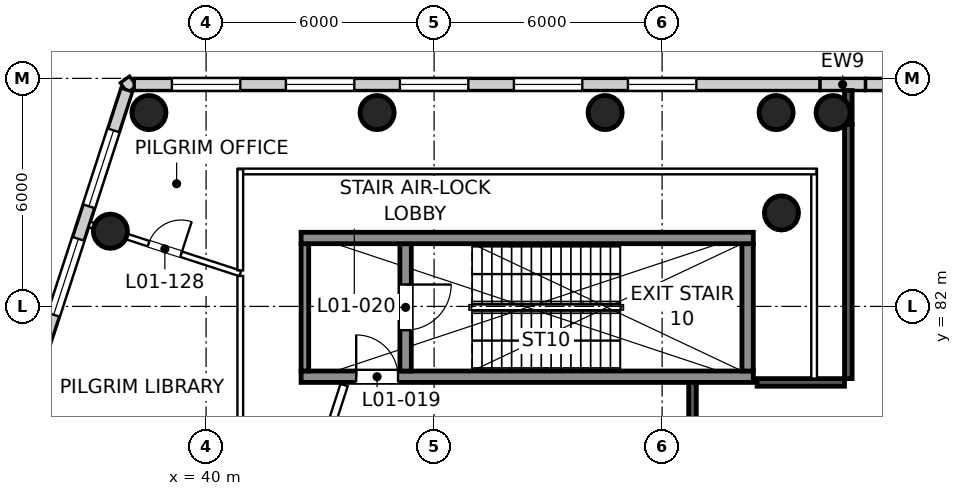
"""IFC4 building model, lengths in metres.
Left out: names, types, materials, properties, quantities, classifications, styles, units other than length and angle.
Written with IfcOpenShell. Run it as: python <this file> out.ifc"""

import sys

from ifc_helpers import new_model, si_unit, direction, frame, frame_2d, origin, origin_2d, place, context, subcontext, project, spatial, rectangle, circle, extrude, element, fill, save


model = new_model("IFC4")
c1 = context("Model", 3, precision=1e-05, world=origin(), true_north=direction((0.0, 1.0)))
c2 = subcontext(c1, "Body", "Model", "MODEL_VIEW")
j1 = project(units=[si_unit("LENGTHUNIT", "METRE"), si_unit("PLANEANGLEUNIT", "RADIAN")], contexts=[c1])
p1 = place(None, origin())
s1 = spatial("IfcSite", under=j1, at=p1, CompositionType="ELEMENT")
p2 = place(p1, origin())
s2 = spatial("IfcBuilding", under=s1, at=p2, CompositionType="ELEMENT")
p3 = place(p2, frame((0.0, 0.0, 9.0)))
s3 = spatial("IfcBuildingStorey", under=s2, at=p3, CompositionType="ELEMENT", Elevation=9.0)
for number, where, z_axis, x_axis in (
    (1, (55.14, 84.46, 0.0), (0.0, 0.0, 1.0), (1.0, 0.0, 0.0)),
    (2, (56.5, 87.1, 0.0), (0.0, 0.0, 1.0), (1.0, 0.0, 0.0)),
    (3, (50.5, 87.1, 0.0), (0.0, 0.0, 1.0), (1.0, 0.0, 0.0)),
    (4, (44.5, 87.1, 0.0), (0.0, 0.0, 1.0), (1.0, 0.0, 0.0)),
    (5, (38.496, 87.1, 0.0), (0.0, 0.0, 1.0), (1.0, 0.0, 0.0)),
    (6, (37.482, 83.978, 0.0), (0.0, 0.0, 1.0), (1.0, 0.0, 0.0)),
    (7, (55.0, 87.1, 0.0), (0.0, 0.0, 1.0), (1.0, 0.0, 0.0)),
):
    element("IfcColumn", number, at=place(p3, frame(where, z_axis=z_axis, x_axis=x_axis)), inside=s3, PredefinedType="COLUMN", context=c2, shape_type="SweptSolid", body=[
        extrude(circle(Radius=0.45, at=origin_2d()), origin(), (0.0, 0.0, 1.0), 6.0),
    ])
p4 = place(p3, frame((38.08, 87.928, 0.0), z_axis=(0.0, 0.0, 1.0), x_axis=(-0.809087927272, -0.587687609145, 0.0)))
e8 = element("IfcWall", 8, at=p4, inside=s3, PredefinedType="SOLIDWALL", context=c2, shape_type="SweptSolid", body=[
    extrude(rectangle(XDim=0.3, YDim=0.32, at=frame_2d((0.15, 0.0))), origin(), (0.0, 0.0, 1.0), 5.65),
])
p5 = place(p3, frame((59.0, 87.84, 0.0), z_axis=(0.0, 0.0, 1.0), x_axis=(-1.0, 0.0, 0.0)))
e9 = element("IfcWall", 9, at=p5, inside=s3, PredefinedType="SOLIDWALL", context=c2, shape_type="SweptSolid", body=[
    extrude(rectangle(XDim=1.649, YDim=0.32, at=frame_2d((0.825, 0.0))), origin(), (0.0, 0.0, 1.0), 5.65),
])
p6 = place(p3, frame((57.351, 87.84, 0.0), z_axis=(0.0, 0.0, 1.0), x_axis=(-1.0, 0.0, 0.0)))
e10 = element("IfcWall", 10, at=p6, inside=s3, PredefinedType="SOLIDWALL", context=c2, shape_type="SweptSolid", body=[
    extrude(rectangle(XDim=1.2, YDim=0.32, at=frame_2d((0.6, 0.0))), origin(), (0.0, 0.0, 1.0), 5.65),
])
p7 = place(p3, frame((56.15, 87.84, 0.0), z_axis=(0.0, 0.0, 1.0), x_axis=(-1.0, 0.0, 0.0)))
e11 = element("IfcWall", 11, at=p7, inside=s3, PredefinedType="SOLIDWALL", context=c2, shape_type="SweptSolid", body=[
    extrude(rectangle(XDim=18.042, YDim=0.32, at=frame_2d((9.021, 0.0))), origin(), (0.0, 0.0, 1.0), 5.65),
])
p8 = place(p7, frame((3.25, 0.0, 0.9)))
e12 = element("IfcOpeningElement", 12, at=p8, cuts=e11, PredefinedType="OPENING", context=c2, shape_type="SweptSolid", body=[
    extrude(rectangle(XDim=1.8, YDim=2.1, at=frame_2d((0.9, 1.05))), frame((0.0, 0.17, 0.0), z_axis=(0.0, -1.0, 0.0), x_axis=(1.0, 0.0, 0.0)), (0.0, 0.0, 1.0), 0.34),
])
p9 = place(p7, frame((6.25, 0.0, 0.9)))
e13 = element("IfcOpeningElement", 13, at=p9, cuts=e11, PredefinedType="OPENING", context=c2, shape_type="SweptSolid", body=[
    extrude(rectangle(XDim=1.8, YDim=2.1, at=frame_2d((0.9, 1.05))), frame((0.0, 0.17, 0.0), z_axis=(0.0, -1.0, 0.0), x_axis=(1.0, 0.0, 0.0)), (0.0, 0.0, 1.0), 0.34),
])
p10 = place(p7, frame((9.25, 0.0, 0.9)))
e14 = element("IfcOpeningElement", 14, at=p10, cuts=e11, PredefinedType="OPENING", context=c2, shape_type="SweptSolid", body=[
    extrude(rectangle(XDim=1.8, YDim=2.1, at=frame_2d((0.9, 1.05))), frame((0.0, 0.17, 0.0), z_axis=(0.0, -1.0, 0.0), x_axis=(1.0, 0.0, 0.0)), (0.0, 0.0, 1.0), 0.34),
])
p11 = place(p7, frame((12.25, 0.0, 0.9)))
e15 = element("IfcOpeningElement", 15, at=p11, cuts=e11, PredefinedType="OPENING", context=c2, shape_type="SweptSolid", body=[
    extrude(rectangle(XDim=1.8, YDim=2.1, at=frame_2d((0.9, 1.05))), frame((0.0, 0.17, 0.0), z_axis=(0.0, -1.0, 0.0), x_axis=(1.0, 0.0, 0.0)), (0.0, 0.0, 1.0), 0.34),
])
p12 = place(p7, frame((15.25, 0.0, 0.9)))
e16 = element("IfcOpeningElement", 16, at=p12, cuts=e11, PredefinedType="OPENING", context=c2, shape_type="SweptSolid", body=[
    extrude(rectangle(XDim=1.8, YDim=2.1, at=frame_2d((0.9, 1.05))), frame((0.0, 0.17, 0.0), z_axis=(0.0, -1.0, 0.0), x_axis=(1.0, 0.0, 0.0)), (0.0, 0.0, 1.0), 0.34),
])
p13 = place(p3, frame((37.912, 87.697, 0.0), z_axis=(0.0, 0.0, 1.0), x_axis=(-0.309016476183, -0.951056684666, 0.0)))
e17 = element("IfcWall", 17, at=p13, inside=s3, PredefinedType="SOLIDWALL", context=c2, shape_type="SweptSolid", body=[
    extrude(rectangle(XDim=28.556, YDim=0.32, at=frame_2d((14.278, 0.0))), origin(), (0.0, 0.0, 1.0), 5.65),
])
p14 = place(p13, frame((1.121, 0.0, 0.9)))
e18 = element("IfcOpeningElement", 18, at=p14, cuts=e17, PredefinedType="OPENING", context=c2, shape_type="SweptSolid", body=[
    extrude(rectangle(XDim=2.1, YDim=3.0, at=frame_2d((1.05, 1.5))), frame((0.0, 0.17, 0.0), z_axis=(0.0, -1.0, 0.0), x_axis=(1.0, 0.0, 0.0)), (0.0, 0.0, 1.0), 0.34),
])
p15 = place(p13, frame((4.121, 0.0, 0.9)))
e19 = element("IfcOpeningElement", 19, at=p15, cuts=e17, PredefinedType="OPENING", context=c2, shape_type="SweptSolid", body=[
    extrude(rectangle(XDim=2.1, YDim=3.0, at=frame_2d((1.05, 1.5))), frame((0.0, 0.17, 0.0), z_axis=(0.0, -1.0, 0.0), x_axis=(1.0, 0.0, 0.0)), (0.0, 0.0, 1.0), 0.34),
])
p16 = place(p13, frame((7.121, 0.0, 0.9)))
e20 = element("IfcOpeningElement", 20, at=p16, cuts=e17, PredefinedType="OPENING", context=c2, shape_type="SweptSolid", body=[
    extrude(rectangle(XDim=2.1, YDim=3.0, at=frame_2d((1.05, 1.5))), frame((0.0, 0.17, 0.0), z_axis=(0.0, -1.0, 0.0), x_axis=(1.0, 0.0, 0.0)), (0.0, 0.0, 1.0), 0.34),
])
p17 = place(p13, frame((10.121, 0.0, 0.9)))
e21 = element("IfcOpeningElement", 21, at=p17, cuts=e17, PredefinedType="OPENING", context=c2, shape_type="SweptSolid", body=[
    extrude(rectangle(XDim=2.1, YDim=3.0, at=frame_2d((1.05, 1.5))), frame((0.0, 0.17, 0.0), z_axis=(0.0, -1.0, 0.0), x_axis=(1.0, 0.0, 0.0)), (0.0, 0.0, 1.0), 0.34),
])
p18 = place(p13, frame((13.121, 0.0, 0.9)))
e22 = element("IfcOpeningElement", 22, at=p18, cuts=e17, PredefinedType="OPENING", context=c2, shape_type="SweptSolid", body=[
    extrude(rectangle(XDim=2.1, YDim=3.0, at=frame_2d((1.05, 1.5))), frame((0.0, 0.17, 0.0), z_axis=(0.0, -1.0, 0.0), x_axis=(1.0, 0.0, 0.0)), (0.0, 0.0, 1.0), 0.34),
])
p19 = place(p13, frame((16.121, 0.0, 0.9)))
e23 = element("IfcOpeningElement", 23, at=p19, cuts=e17, PredefinedType="OPENING", context=c2, shape_type="SweptSolid", body=[
    extrude(rectangle(XDim=2.1, YDim=3.0, at=frame_2d((1.05, 1.5))), frame((0.0, 0.17, 0.0), z_axis=(0.0, -1.0, 0.0), x_axis=(1.0, 0.0, 0.0)), (0.0, 0.0, 1.0), 0.34),
])
p20 = place(p13, frame((19.121, 0.0, 0.9)))
e24 = element("IfcOpeningElement", 24, at=p20, cuts=e17, PredefinedType="OPENING", context=c2, shape_type="SweptSolid", body=[
    extrude(rectangle(XDim=2.1, YDim=3.0, at=frame_2d((1.05, 1.5))), frame((0.0, 0.17, 0.0), z_axis=(0.0, -1.0, 0.0), x_axis=(1.0, 0.0, 0.0)), (0.0, 0.0, 1.0), 0.34),
])
p21 = place(p13, frame((22.121, 0.0, 0.9)))
e25 = element("IfcOpeningElement", 25, at=p21, cuts=e17, PredefinedType="OPENING", context=c2, shape_type="SweptSolid", body=[
    extrude(rectangle(XDim=2.1, YDim=3.0, at=frame_2d((1.05, 1.5))), frame((0.0, 0.17, 0.0), z_axis=(0.0, -1.0, 0.0), x_axis=(1.0, 0.0, 0.0)), (0.0, 0.0, 1.0), 0.34),
])
p22 = place(p13, frame((25.121, 0.0, 0.9)))
e26 = element("IfcOpeningElement", 26, at=p22, cuts=e17, PredefinedType="OPENING", context=c2, shape_type="SweptSolid", body=[
    extrude(rectangle(XDim=2.1, YDim=3.0, at=frame_2d((1.05, 1.5))), frame((0.0, 0.17, 0.0), z_axis=(0.0, -1.0, 0.0), x_axis=(1.0, 0.0, 0.0)), (0.0, 0.0, 1.0), 0.34),
])
p23 = place(p3, frame((42.5, 80.15, 0.0), z_axis=(0.0, 0.0, 1.0), x_axis=(1.0, 0.0, 0.0)))
e27 = element("IfcWall", 27, at=p23, inside=s3, PredefinedType="SHEAR", context=c2, shape_type="SweptSolid", body=[
    extrude(rectangle(XDim=11.9, YDim=0.3, at=frame_2d((5.95, 0.0))), origin(), (0.0, 0.0, 1.0), 6.0),
])
p24 = place(p23, frame((1.45, 0.0, 0.0)))
e28 = element("IfcOpeningElement", 28, at=p24, cuts=e27, PredefinedType="OPENING", context=c2, shape_type="SweptSolid", body=[
    extrude(rectangle(XDim=1.1, YDim=2.1, at=frame_2d((0.55, 1.05))), frame((0.0, 0.16, 0.0), z_axis=(0.0, -1.0, 0.0), x_axis=(1.0, 0.0, 0.0)), (0.0, 0.0, 1.0), 0.32),
])
p25 = place(p3, frame((42.6, 80.3, 0.0), z_axis=(0.0, 0.0, 1.0), x_axis=(0.0, 1.0, 0.0)))
e29 = element("IfcWall", 29, at=p25, inside=s3, PredefinedType="SHEAR", context=c2, shape_type="SweptSolid", body=[
    extrude(rectangle(XDim=3.35, YDim=0.2, at=frame_2d((1.675, 0.0))), origin(), (0.0, 0.0, 1.0), 6.0),
])
p26 = place(p3, frame((45.25, 80.3, 0.0), z_axis=(0.0, 0.0, 1.0), x_axis=(0.0, 1.0, 0.0)))
e30 = element("IfcWall", 30, at=p26, inside=s3, PredefinedType="SHEAR", context=c2, shape_type="SweptSolid", body=[
    extrude(rectangle(XDim=3.35, YDim=0.3, at=frame_2d((1.675, 0.0))), origin(), (0.0, 0.0, 1.0), 6.0),
])
p27 = place(p26, frame((1.075, 0.0, 0.0)))
e31 = element("IfcOpeningElement", 31, at=p27, cuts=e30, PredefinedType="OPENING", context=c2, shape_type="SweptSolid", body=[
    extrude(rectangle(XDim=1.2, YDim=2.1, at=frame_2d((0.6, 1.05))), frame((0.0, 0.16, 0.0), z_axis=(0.0, -1.0, 0.0), x_axis=(1.0, 0.0, 0.0)), (0.0, 0.0, 1.0), 0.32),
])
p28 = place(p3, frame((54.25, 80.3, 0.0), z_axis=(0.0, 0.0, 1.0), x_axis=(0.0, 1.0, 0.0)))
e32 = element("IfcWall", 32, at=p28, inside=s3, PredefinedType="SHEAR", context=c2, shape_type="SweptSolid", body=[
    extrude(rectangle(XDim=3.35, YDim=0.3, at=frame_2d((1.675, 0.0))), origin(), (0.0, 0.0, 1.0), 6.0),
])
p29 = place(p3, frame((42.5, 83.8, 0.0), z_axis=(0.0, 0.0, 1.0), x_axis=(1.0, 0.0, 0.0)))
e33 = element("IfcWall", 33, at=p29, inside=s3, PredefinedType="SHEAR", context=c2, shape_type="SweptSolid", body=[
    extrude(rectangle(XDim=11.9, YDim=0.3, at=frame_2d((5.95, 0.0))), origin(), (0.0, 0.0, 1.0), 6.0),
])
p30 = place(p3, frame((37.833, 62.081, 0.0), z_axis=(0.0, 0.0, 1.0), x_axis=(0.309014892187, 0.951057199335, 0.0)))
e34 = element("IfcWall", 34, at=p30, inside=s3, PredefinedType="PARTITIONING", context=c2, shape_type="SweptSolid", body=[
    extrude(rectangle(XDim=18.769, YDim=0.2, at=frame_2d((9.384, 0.0))), origin(), (0.0, 0.0, 1.0), 5.65),
])
p31 = place(p30, frame((13.988, 0.0, 0.0)))
e35 = element("IfcOpeningElement", 35, at=p31, cuts=e34, PredefinedType="OPENING", context=c2, shape_type="SweptSolid", body=[
    extrude(rectangle(XDim=0.9, YDim=2.1, at=frame_2d((0.45, 1.05))), frame((0.0, 0.11, 0.0), z_axis=(0.0, -1.0, 0.0), x_axis=(1.0, 0.0, 0.0)), (0.0, 0.0, 1.0), 0.22),
])
p32 = place(p30, frame((6.767, 0.0, 0.0)))
e36 = element("IfcOpeningElement", 36, at=p32, cuts=e34, PredefinedType="OPENING", context=c2, shape_type="SweptSolid", body=[
    extrude(rectangle(XDim=0.9, YDim=2.1, at=frame_2d((0.45, 1.05))), frame((0.0, 0.11, 0.0), z_axis=(0.0, -1.0, 0.0), x_axis=(1.0, 0.0, 0.0)), (0.0, 0.0, 1.0), 0.22),
])
p33 = place(p30, frame((1.731, 0.0, 0.0)))
e37 = element("IfcOpeningElement", 37, at=p33, cuts=e34, PredefinedType="OPENING", context=c2, shape_type="SweptSolid", body=[
    extrude(rectangle(XDim=0.8, YDim=2.1, at=frame_2d((0.4, 1.05))), frame((0.0, 0.11, 0.0), z_axis=(0.0, -1.0, 0.0), x_axis=(1.0, 0.0, 0.0)), (0.0, 0.0, 1.0), 0.22),
])
p34 = place(p3, frame((54.499, 80.0, 0.0), z_axis=(0.0, 0.0, 1.0), x_axis=(1.0, 0.0, 0.0)))
e38 = element("IfcWall", 38, at=p34, inside=s3, PredefinedType="PARTITIONING", context=c2, shape_type="SweptSolid", body=[
    extrude(rectangle(XDim=2.301, YDim=0.2, at=frame_2d((1.15, 0.0))), origin(), (0.0, 0.0, 1.0), 5.65),
])
p35 = place(p3, frame((56.9, 80.1, 0.0), z_axis=(0.0, 0.0, 1.0), x_axis=(0.0, 1.0, 0.0)))
e39 = element("IfcWall", 39, at=p35, inside=s3, PredefinedType="PARTITIONING", context=c2, shape_type="SweptSolid", body=[
    extrude(rectangle(XDim=6.682, YDim=0.2, at=frame_2d((3.341, 0.0))), origin(), (0.0, 0.0, 1.0), 5.65),
])
p36 = place(p3, frame((56.9, 86.782, 0.0), z_axis=(0.0, 0.0, 1.0), x_axis=(0.0, 1.0, 0.0)))
e40 = element("IfcWall", 40, at=p36, inside=s3, PredefinedType="PARTITIONING", context=c2, shape_type="SweptSolid", body=[
    extrude(rectangle(XDim=0.897, YDim=0.2, at=frame_2d((0.449, 0.0))), origin(), (0.0, 0.0, 1.0), 4.95),
])
p37 = place(p3, frame((36.93, 84.157, 0.0), z_axis=(0.0, 0.0, 1.0), x_axis=(0.951059855583, -0.309006716915, 0.0)))
e41 = element("IfcWall", 41, at=p37, inside=s3, PredefinedType="PARTITIONING", context=c2, shape_type="SweptSolid", body=[
    extrude(rectangle(XDim=4.174, YDim=0.15, at=frame_2d((2.087, 0.0))), origin(), (0.0, 0.0, 1.0), 5.65),
])
p38 = place(p37, frame((1.637, 0.0, 0.0)))
e42 = element("IfcOpeningElement", 42, at=p38, cuts=e41, PredefinedType="OPENING", context=c2, shape_type="SweptSolid", body=[
    extrude(rectangle(XDim=0.9, YDim=2.1, at=frame_2d((0.45, 1.05))), frame((0.0, 0.085, 0.0), z_axis=(0.0, -1.0, 0.0), x_axis=(1.0, 0.0, 0.0)), (0.0, 0.0, 1.0), 0.17),
])
p39 = place(p3, frame((52.8, 64.875, 0.0), z_axis=(0.0, 0.0, 1.0), x_axis=(0.0, 1.0, 0.0)))
e43 = element("IfcWall", 43, at=p39, inside=s3, PredefinedType="PARTITIONING", context=c2, shape_type="SweptSolid", body=[
    extrude(rectangle(XDim=15.125, YDim=0.2, at=frame_2d((7.562, 0.0))), origin(), (0.0, 0.0, 1.0), 5.65),
])
p40 = place(p39, frame((3.637, 0.0, 0.0)))
e44 = element("IfcOpeningElement", 44, at=p40, cuts=e43, PredefinedType="OPENING", context=c2, shape_type="SweptSolid", body=[
    extrude(rectangle(XDim=1.8, YDim=2.1, at=frame_2d((0.9, 1.05))), frame((0.0, 0.11, 0.0), z_axis=(0.0, -1.0, 0.0), x_axis=(1.0, 0.0, 0.0)), (0.0, 0.0, 1.0), 0.22),
])
p41 = place(p39, frame((9.688, 0.0, 0.0)))
e45 = element("IfcOpeningElement", 45, at=p41, cuts=e43, PredefinedType="OPENING", context=c2, shape_type="SweptSolid", body=[
    extrude(rectangle(XDim=1.8, YDim=2.1, at=frame_2d((0.9, 1.05))), frame((0.0, 0.11, 0.0), z_axis=(0.0, -1.0, 0.0), x_axis=(1.0, 0.0, 0.0)), (0.0, 0.0, 1.0), 0.22),
])
p42 = place(p3, frame((40.9, 82.8, 0.0), z_axis=(0.0, 0.0, 1.0), x_axis=(0.0, -1.0, 0.0)))
e46 = element("IfcWall", 46, at=p42, inside=s3, PredefinedType="PARTITIONING", context=c2, shape_type="SweptSolid", body=[
    extrude(rectangle(XDim=4.46, YDim=0.15, at=frame_2d((2.23, 0.0))), origin(), (0.0, 0.0, 1.0), 5.65),
])
p43 = place(p3, frame((56.0, 80.1, 0.0), z_axis=(0.0, 0.0, 1.0), x_axis=(0.0, 1.0, 0.0)))
e47 = element("IfcWall", 47, at=p43, inside=s3, PredefinedType="PARTITIONING", context=c2, shape_type="SweptSolid", body=[
    extrude(rectangle(XDim=5.51, YDim=0.15, at=frame_2d((2.755, 0.0))), origin(), (0.0, 0.0, 1.0), 5.65),
])
p44 = place(p3, frame((56.06, 85.55, 0.0), z_axis=(0.0, 0.0, 1.0), x_axis=(-1.0, 0.0, 0.0)))
e48 = element("IfcWall", 48, at=p44, inside=s3, PredefinedType="PARTITIONING", context=c2, shape_type="SweptSolid", body=[
    extrude(rectangle(XDim=15.22, YDim=0.15, at=frame_2d((7.61, 0.0))), origin(), (0.0, 0.0, 1.0), 4.95),
])
p45 = place(p3, frame((40.9, 85.61, 0.0), z_axis=(0.0, 0.0, 1.0), x_axis=(0.0, -1.0, 0.0)))
e49 = element("IfcWall", 49, at=p45, inside=s3, PredefinedType="PARTITIONING", context=c2, shape_type="SweptSolid", body=[
    extrude(rectangle(XDim=2.661, YDim=0.15, at=frame_2d((1.331, 0.0))), origin(), (0.0, 0.0, 1.0), 5.65),
])
p46 = place(p8, origin())
e50 = element("IfcWindow", 50, at=p46, inside=s3, PartitioningType="SINGLE_PANEL", PredefinedType="WINDOW", context=c2, shape_type="SweptSolid", body=[
    extrude(rectangle(XDim=1.8, YDim=2.1, at=frame_2d((0.9, 1.05))), frame((0.0, 0.07, 0.0), z_axis=(0.0, -1.0, 0.0), x_axis=(1.0, 0.0, 0.0)), (0.0, 0.0, 1.0), 0.06),
])
fill(e12, e50)
p47 = place(p9, origin())
e51 = element("IfcWindow", 51, at=p47, inside=s3, PartitioningType="SINGLE_PANEL", PredefinedType="WINDOW", context=c2, shape_type="SweptSolid", body=[
    extrude(rectangle(XDim=1.8, YDim=2.1, at=frame_2d((0.9, 1.05))), frame((0.0, 0.07, 0.0), z_axis=(0.0, -1.0, 0.0), x_axis=(1.0, 0.0, 0.0)), (0.0, 0.0, 1.0), 0.06),
])
fill(e13, e51)
p48 = place(p10, origin())
e52 = element("IfcWindow", 52, at=p48, inside=s3, PartitioningType="SINGLE_PANEL", PredefinedType="WINDOW", context=c2, shape_type="SweptSolid", body=[
    extrude(rectangle(XDim=1.8, YDim=2.1, at=frame_2d((0.9, 1.05))), frame((0.0, 0.07, 0.0), z_axis=(0.0, -1.0, 0.0), x_axis=(1.0, 0.0, 0.0)), (0.0, 0.0, 1.0), 0.06),
])
fill(e14, e52)
p49 = place(p11, origin())
e53 = element("IfcWindow", 53, at=p49, inside=s3, PartitioningType="SINGLE_PANEL", PredefinedType="WINDOW", context=c2, shape_type="SweptSolid", body=[
    extrude(rectangle(XDim=1.8, YDim=2.1, at=frame_2d((0.9, 1.05))), frame((0.0, 0.07, 0.0), z_axis=(0.0, -1.0, 0.0), x_axis=(1.0, 0.0, 0.0)), (0.0, 0.0, 1.0), 0.06),
])
fill(e15, e53)
p50 = place(p12, origin())
e54 = element("IfcWindow", 54, at=p50, inside=s3, PartitioningType="SINGLE_PANEL", PredefinedType="WINDOW", context=c2, shape_type="SweptSolid", body=[
    extrude(rectangle(XDim=1.8, YDim=2.1, at=frame_2d((0.9, 1.05))), frame((0.0, 0.07, 0.0), z_axis=(0.0, -1.0, 0.0), x_axis=(1.0, 0.0, 0.0)), (0.0, 0.0, 1.0), 0.06),
])
fill(e16, e54)
p51 = place(p14, origin())
e55 = element("IfcWindow", 55, at=p51, inside=s3, PartitioningType="SINGLE_PANEL", PredefinedType="WINDOW", context=c2, shape_type="SweptSolid", body=[
    extrude(rectangle(XDim=2.1, YDim=3.0, at=frame_2d((1.05, 1.5))), frame((0.0, 0.07, 0.0), z_axis=(0.0, -1.0, 0.0), x_axis=(1.0, 0.0, 0.0)), (0.0, 0.0, 1.0), 0.06),
])
fill(e18, e55)
p52 = place(p15, origin())
e56 = element("IfcWindow", 56, at=p52, inside=s3, PartitioningType="SINGLE_PANEL", PredefinedType="WINDOW", context=c2, shape_type="SweptSolid", body=[
    extrude(rectangle(XDim=2.1, YDim=3.0, at=frame_2d((1.05, 1.5))), frame((0.0, 0.07, 0.0), z_axis=(0.0, -1.0, 0.0), x_axis=(1.0, 0.0, 0.0)), (0.0, 0.0, 1.0), 0.06),
])
fill(e19, e56)
p53 = place(p24, origin())
e57 = element("IfcDoor", 57, at=p53, inside=s3, OperationType="SINGLE_SWING_LEFT", PredefinedType="DOOR", context=c2, shape_type="SweptSolid", body=[
    extrude(rectangle(XDim=1.1, YDim=2.1, at=frame_2d((0.55, 1.05))), frame((0.0, 0.025, 0.0), z_axis=(0.0, -1.0, 0.0), x_axis=(1.0, 0.0, 0.0)), (0.0, 0.0, 1.0), 0.05),
])
fill(e28, e57)
p54 = place(p27, frame((1.2, 0.0, 0.0), z_axis=(0.0, 0.0, 1.0), x_axis=(-1.0, 0.0, 0.0)))
e58 = element("IfcDoor", 58, at=p54, inside=s3, OperationType="SINGLE_SWING_LEFT", PredefinedType="DOOR", context=c2, shape_type="SweptSolid", body=[
    extrude(rectangle(XDim=1.2, YDim=2.1, at=frame_2d((0.6, 1.05))), frame((0.0, 0.025, 0.0), z_axis=(0.0, -1.0, 0.0), x_axis=(1.0, 0.0, 0.0)), (0.0, 0.0, 1.0), 0.05),
])
fill(e31, e58)
p55 = place(p38, origin())
e59 = element("IfcDoor", 59, at=p55, inside=s3, OperationType="SINGLE_SWING_RIGHT", PredefinedType="DOOR", context=c2, shape_type="SweptSolid", body=[
    extrude(rectangle(XDim=0.9, YDim=2.1, at=frame_2d((0.45, 1.05))), frame((0.0, 0.025, 0.0), z_axis=(0.0, -1.0, 0.0), x_axis=(1.0, 0.0, 0.0)), (0.0, 0.0, 1.0), 0.05),
])
fill(e42, e59)
save(model, sys.argv[1])
